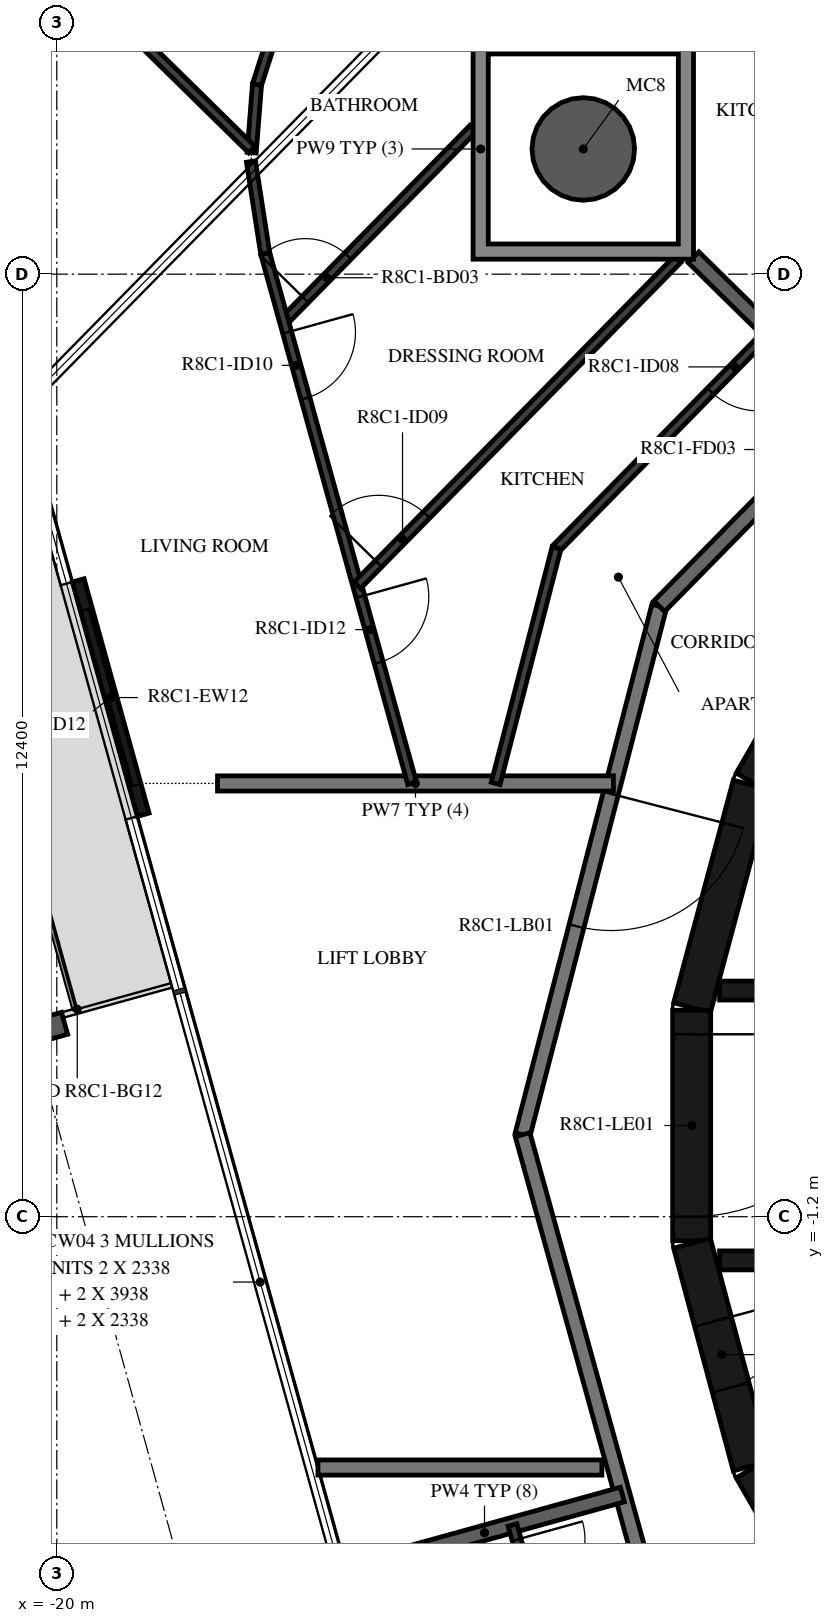
"""IFC4 building model, lengths in metres.
Left out: names, types, materials, properties, quantities, classifications, styles, units other than length and angle.
Written with IfcOpenShell. Run it as: python <this file> out.ifc"""

import sys

from ifc_helpers import new_model, si_unit, direction, frame, frame_2d, origin, origin_2d, place, context, subcontext, project, spatial, polyline, rectangle, hollow_circle, i_section, outline, extrude, element, fill, save


model = new_model("IFC4")
c1 = context("Model", 3, precision=1e-05, world=origin(), true_north=direction((0.0, 1.0)))
c2 = subcontext(c1, "Body", "Model", "MODEL_VIEW")
j1 = project(units=[si_unit("LENGTHUNIT", "METRE"), si_unit("PLANEANGLEUNIT", "RADIAN")], contexts=[c1])
p1 = place(None, origin())
s1 = spatial("IfcSite", under=j1, at=p1, CompositionType="ELEMENT")
p2 = place(p1, origin())
s2 = spatial("IfcBuilding", under=s1, at=p2, CompositionType="ELEMENT")
p3 = place(p2, frame((0.0, 0.0, 322.7)))
s3 = spatial("IfcBuildingStorey", under=s2, at=p3, CompositionType="ELEMENT", Elevation=322.7)
p4 = place(p3, frame((-13.073, 12.847, -0.38), z_axis=(0.0, 0.0, 1.0), x_axis=(1.0, 0.0, 0.0)))
e1 = element("IfcColumn", 1, at=p4, inside=s3, PredefinedType="COLUMN", context=c2, shape_type="SweptSolid", body=[
    extrude(hollow_circle(Radius=0.675, WallThickness=0.03, at=origin_2d()), origin(), (0.0, 0.0, 1.0), 2.616),
])
p5 = place(p3, frame((-20.331, 1.224, -0.38), z_axis=(0.0, 0.0, 1.0), x_axis=(-0.267238143562, 0.963630517691, 0.0)))
e2 = element("IfcColumn", 2, at=p5, inside=s3, PredefinedType="COLUMN", context=c2, shape_type="SweptSolid", body=[
    extrude(i_section(OverallWidth=0.3, OverallDepth=0.9, WebThickness=0.019, FlangeThickness=0.035, FilletRadius=0.03, at=origin_2d()), origin(), (0.0, 0.0, 1.0), 2.616),
])
p6 = place(p3, frame((-19.718, 7.171, 0.0), z_axis=(0.0, 0.0, 1.0), x_axis=(0.267266077957, -0.963622770369, 0.0)))
e3 = element("IfcWall", 3, at=p6, inside=s3, PredefinedType="STANDARD", context=c2, shape_type="SweptSolid", body=[
    extrude(rectangle(XDim=3.2, YDim=0.16, at=frame_2d((1.6, 0.0))), origin(), (0.0, 0.0, 1.0), 3.05),
])
p7 = place(p6, frame((0.4, 0.0, 0.0)))
e4 = element("IfcOpeningElement", 4, at=p7, cuts=e3, PredefinedType="OPENING", context=c2, shape_type="SweptSolid", body=[
    extrude(rectangle(XDim=2.4, YDim=2.4, at=frame_2d((1.2, 1.2))), frame((0.0, 0.09, 0.0), z_axis=(0.0, -1.0, 0.0), x_axis=(1.0, 0.0, 0.0)), (0.0, 0.0, 1.0), 0.18),
])
for number, where, z_axis, x_axis in (
    (5, (-9.329, 7.137, 0.0), (0.0, 0.0, 1.0), (-0.5, -0.866, 0.0)),
    (6, (-10.858, 4.479, 0.0), (0.0, 0.0, 1.0), (-0.259, -0.966, 0.0)),
):
    element("IfcWall", number, at=place(p3, frame(where, z_axis=z_axis, x_axis=x_axis)), inside=s3, PredefinedType="SHEAR", context=c2, shape_type="SweptSolid", body=[
        extrude(rectangle(XDim=3.033, YDim=0.5, at=frame_2d((1.516, 0.0))), origin(), (0.0, 0.0, 1.0), 3.05),
    ])
p8 = place(p3, frame((-11.647, 1.516, 0.0), z_axis=(0.0, 0.0, 1.0), x_axis=(0.0, -1.0, 0.0)))
e7 = element("IfcWall", 7, at=p8, inside=s3, PredefinedType="SHEAR", context=c2, shape_type="SweptSolid", body=[
    extrude(rectangle(XDim=3.033, YDim=0.5, at=frame_2d((1.516, 0.0))), origin(), (0.0, 0.0, 1.0), 3.05),
])
p9 = place(p8, frame((0.316, 0.0, 0.0)))
e8 = element("IfcOpeningElement", 8, at=p9, cuts=e7, PredefinedType="OPENING", context=c2, shape_type="SweptSolid", body=[
    extrude(rectangle(XDim=2.4, YDim=2.1, at=frame_2d((1.2, 1.05))), frame((0.0, 0.26, 0.0), z_axis=(0.0, -1.0, 0.0), x_axis=(1.0, 0.0, 0.0)), (0.0, 0.0, 1.0), 0.52),
])
p10 = place(p3, frame((-11.643, -1.55, 0.0), z_axis=(0.0, 0.0, 1.0), x_axis=(0.258734743916, -0.965948410781, 0.0)))
e9 = element("IfcWall", 9, at=p10, inside=s3, PredefinedType="SHEAR", context=c2, shape_type="SweptSolid", body=[
    extrude(rectangle(XDim=3.033, YDim=0.5, at=frame_2d((1.516, 0.0))), origin(), (0.0, 0.0, 1.0), 3.05),
])
p11 = place(p10, frame((1.066, 0.0, 0.0)))
e10 = element("IfcOpeningElement", 10, at=p11, cuts=e9, PredefinedType="OPENING", context=c2, shape_type="SweptSolid", body=[
    extrude(rectangle(XDim=0.9, YDim=2.1, at=frame_2d((0.45, 1.05))), frame((0.0, 0.26, 0.0), z_axis=(0.0, -1.0, 0.0), x_axis=(1.0, 0.0, 0.0)), (0.0, 0.0, 1.0), 0.52),
])
p12 = place(p3, frame((-10.845, -4.51, 0.0), z_axis=(0.0, 0.0, 1.0), x_axis=(0.500087131594, -0.865975092491, 0.0)))
e11 = element("IfcWall", 11, at=p12, inside=s3, PredefinedType="SHEAR", context=c2, shape_type="SweptSolid", body=[
    extrude(rectangle(XDim=3.033, YDim=0.5, at=frame_2d((1.516, 0.0))), origin(), (0.0, 0.0, 1.0), 3.05),
])
p13 = place(p3, frame((-11.28, 1.775, 0.0), z_axis=(0.0, 0.0, 1.0), x_axis=(1.0, 0.0, 0.0)))
e12 = element("IfcWall", 12, at=p13, inside=s3, PredefinedType="SHEAR", context=c2, shape_type="SweptSolid", body=[
    extrude(rectangle(XDim=14.38, YDim=0.25, at=frame_2d((7.19, 0.0))), origin(), (0.0, 0.0, 1.0), 3.05),
])
p14 = place(p13, frame((3.305, 0.0, 0.0)))
e13 = element("IfcOpeningElement", 13, at=p14, cuts=e12, PredefinedType="OPENING", context=c2, shape_type="SweptSolid", body=[
    extrude(rectangle(XDim=0.9, YDim=2.1, at=frame_2d((0.45, 1.05))), frame((0.0, 0.135, 0.0), z_axis=(0.0, -1.0, 0.0), x_axis=(1.0, 0.0, 0.0)), (0.0, 0.0, 1.0), 0.27),
])
p15 = place(p13, frame((9.755, 0.0, 0.0)))
e14 = element("IfcOpeningElement", 14, at=p15, cuts=e12, PredefinedType="OPENING", context=c2, shape_type="SweptSolid", body=[
    extrude(rectangle(XDim=0.9, YDim=2.1, at=frame_2d((0.45, 1.05))), frame((0.0, 0.135, 0.0), z_axis=(0.0, -1.0, 0.0), x_axis=(1.0, 0.0, 0.0)), (0.0, 0.0, 1.0), 0.27),
])
p16 = place(p3, frame((-11.28, -1.775, 0.0), z_axis=(0.0, 0.0, 1.0), x_axis=(1.0, 0.0, 0.0)))
e15 = element("IfcWall", 15, at=p16, inside=s3, PredefinedType="SHEAR", context=c2, shape_type="SweptSolid", body=[
    extrude(rectangle(XDim=14.38, YDim=0.25, at=frame_2d((7.19, 0.0))), origin(), (0.0, 0.0, 1.0), 3.05),
])
p17 = place(p16, frame((6.43, 0.0, 0.0)))
e16 = element("IfcOpeningElement", 16, at=p17, cuts=e15, PredefinedType="OPENING", context=c2, shape_type="SweptSolid", body=[
    extrude(rectangle(XDim=1.1, YDim=2.1, at=frame_2d((0.55, 1.05))), frame((0.0, 0.135, 0.0), z_axis=(0.0, -1.0, 0.0), x_axis=(1.0, 0.0, 0.0)), (0.0, 0.0, 1.0), 0.27),
])
p18 = place(p16, frame((8.58, 0.0, 0.0)))
e17 = element("IfcOpeningElement", 17, at=p18, cuts=e15, PredefinedType="OPENING", context=c2, shape_type="SweptSolid", body=[
    extrude(rectangle(XDim=1.1, YDim=2.1, at=frame_2d((0.55, 1.05))), frame((0.0, 0.135, 0.0), z_axis=(0.0, -1.0, 0.0), x_axis=(1.0, 0.0, 0.0)), (0.0, 0.0, 1.0), 0.27),
])
p19 = place(p16, frame((10.73, 0.0, 0.0)))
e18 = element("IfcOpeningElement", 18, at=p19, cuts=e15, PredefinedType="OPENING", context=c2, shape_type="SweptSolid", body=[
    extrude(rectangle(XDim=1.1, YDim=2.1, at=frame_2d((0.55, 1.05))), frame((0.0, 0.135, 0.0), z_axis=(0.0, -1.0, 0.0), x_axis=(1.0, 0.0, 0.0)), (0.0, 0.0, 1.0), 0.27),
])
p20 = place(p16, frame((3.305, 0.0, 0.0)))
e19 = element("IfcOpeningElement", 19, at=p20, cuts=e15, PredefinedType="OPENING", context=c2, shape_type="SweptSolid", body=[
    extrude(rectangle(XDim=0.9, YDim=2.1, at=frame_2d((0.45, 1.05))), frame((0.0, 0.135, 0.0), z_axis=(0.0, -1.0, 0.0), x_axis=(1.0, 0.0, 0.0)), (0.0, 0.0, 1.0), 0.27),
])
p21 = place(p16, frame((12.98, 0.0, 0.0)))
e20 = element("IfcOpeningElement", 20, at=p21, cuts=e15, PredefinedType="OPENING", context=c2, shape_type="SweptSolid", body=[
    extrude(rectangle(XDim=0.9, YDim=2.1, at=frame_2d((0.45, 1.05))), frame((0.0, 0.135, 0.0), z_axis=(0.0, -1.0, 0.0), x_axis=(1.0, 0.0, 0.0)), (0.0, 0.0, 1.0), 0.27),
])
p22 = place(p3, frame((-12.074, 6.831, 0.0), z_axis=(0.0, 0.0, 1.0), x_axis=(-0.250391063186, -0.968144780225, 0.0)))
e21 = element("IfcWall", 21, at=p22, inside=s3, PredefinedType="STANDARD", context=c2, shape_type="SweptSolid", body=[
    extrude(rectangle(XDim=7.181, YDim=0.2, at=frame_2d((3.591, 0.0))), origin(), (0.0, 0.0, 1.0), 3.05),
])
p23 = place(p22, frame((2.548, 0.0, 0.0)))
e22 = element("IfcOpeningElement", 22, at=p23, cuts=e21, PredefinedType="OPENING", context=c2, shape_type="SweptSolid", body=[
    extrude(rectangle(XDim=1.8, YDim=2.1, at=frame_2d((0.9, 1.05))), frame((0.0, 0.11, 0.0), z_axis=(0.0, -1.0, 0.0), x_axis=(1.0, 0.0, 0.0)), (0.0, 0.0, 1.0), 0.22),
])
p24 = place(p3, frame((-13.872, -0.121, 0.0), z_axis=(0.0, 0.0, 1.0), x_axis=(0.267254575108, -0.963625960674, 0.0)))
e23 = element("IfcWall", 23, at=p24, inside=s3, PredefinedType="STANDARD", context=c2, shape_type="SweptSolid", body=[
    extrude(rectangle(XDim=7.181, YDim=0.2, at=frame_2d((3.591, 0.0))), origin(), (0.0, 0.0, 1.0), 3.05),
])
p25 = place(p3, frame((-7.041, 11.953, 0.0), z_axis=(0.0, 0.0, 1.0), x_axis=(-0.70090916255, -0.713250549143, 0.0)))
e24 = element("IfcWall", 24, at=p25, inside=s3, PredefinedType="STANDARD", context=c2, shape_type="SweptSolid", body=[
    extrude(rectangle(XDim=7.181, YDim=0.2, at=frame_2d((3.59, 0.0))), origin(), (0.0, 0.0, 1.0), 3.05),
])
p26 = place(p25, frame((2.39, 0.0, 0.0)))
e25 = element("IfcOpeningElement", 25, at=p26, cuts=e24, PredefinedType="OPENING", context=c2, shape_type="SweptSolid", body=[
    extrude(rectangle(XDim=1.0, YDim=2.1, at=frame_2d((0.5, 1.05))), frame((0.0, 0.11, 0.0), z_axis=(0.0, -1.0, 0.0), x_axis=(1.0, 0.0, 0.0)), (0.0, 0.0, 1.0), 0.22),
])
p27 = place(p25, frame((3.791, 0.0, 0.0)))
e26 = element("IfcOpeningElement", 26, at=p27, cuts=e24, PredefinedType="OPENING", context=c2, shape_type="SweptSolid", body=[
    extrude(rectangle(XDim=1.0, YDim=2.1, at=frame_2d((0.5, 1.05))), frame((0.0, 0.11, 0.0), z_axis=(0.0, -1.0, 0.0), x_axis=(1.0, 0.0, 0.0)), (0.0, 0.0, 1.0), 0.22),
])
p28 = place(p3, frame((-12.677, 4.5, 0.0), z_axis=(0.0, 0.0, 1.0), x_axis=(-1.0, 0.0, 0.0)))
e27 = element("IfcWall", 27, at=p28, inside=s3, PredefinedType="STANDARD", context=c2, shape_type="SweptSolid", body=[
    extrude(rectangle(XDim=5.208, YDim=0.2, at=frame_2d((2.604, 0.0))), origin(), (0.0, 0.0, 1.0), 3.05),
])
p29 = place(p3, frame((-16.564, -4.5, 0.0), z_axis=(0.0, 0.0, 1.0), x_axis=(1.0, 0.0, 0.0)))
e28 = element("IfcWall", 28, at=p29, inside=s3, PredefinedType="STANDARD", context=c2, shape_type="SweptSolid", body=[
    extrude(rectangle(XDim=3.736, YDim=0.2, at=frame_2d((1.868, 0.0))), origin(), (0.0, 0.0, 1.0), 3.05),
])
p30 = place(p3, frame((-11.623, 11.422, 0.0), z_axis=(0.0, 0.0, 1.0), x_axis=(0.713233657229, -0.700926351478, 0.0)))
e29 = element("IfcWall", 29, at=p30, inside=s3, PredefinedType="STANDARD", context=c2, shape_type="SweptSolid", body=[
    extrude(rectangle(XDim=2.896, YDim=0.2, at=frame_2d((1.448, 0.0))), origin(), (0.0, 0.0, 1.0), 3.05),
])
p31 = place(p3, frame((-16.187, -5.862, 0.0), z_axis=(0.0, 0.0, 1.0), x_axis=(0.963631166683, 0.267235803358, 0.0)))
e30 = element("IfcWall", 30, at=p31, inside=s3, PredefinedType="STANDARD", context=c2, shape_type="SweptSolid", body=[
    extrude(rectangle(XDim=3.765, YDim=0.2, at=frame_2d((1.882, 0.0))), origin(), (0.0, 0.0, 1.0), 3.05),
])
p32 = place(p3, frame((-8.413, 12.698, 0.0), z_axis=(0.0, 0.0, 1.0), x_axis=(-0.700901588882, -0.713257991686, 0.0)))
e31 = element("IfcWall", 31, at=p32, inside=s3, PredefinedType="PARTITIONING", context=c2, shape_type="SweptSolid", body=[
    extrude(rectangle(XDim=7.153, YDim=0.12, at=frame_2d((3.576, 0.0))), origin(), (0.0, 0.0, 1.0), 3.05),
])
p33 = place(p32, frame((3.36, 0.0, 0.0)))
e32 = element("IfcOpeningElement", 32, at=p33, cuts=e31, PredefinedType="OPENING", context=c2, shape_type="SweptSolid", body=[
    extrude(rectangle(XDim=0.9, YDim=2.1, at=frame_2d((0.45, 1.05))), frame((0.0, 0.07, 0.0), z_axis=(0.0, -1.0, 0.0), x_axis=(1.0, 0.0, 0.0)), (0.0, 0.0, 1.0), 0.14),
])
p34 = place(p3, frame((-13.426, 7.596, 0.0), z_axis=(0.0, 0.0, 1.0), x_axis=(-0.250342106136, -0.968157440655, 0.0)))
e33 = element("IfcWall", 33, at=p34, inside=s3, PredefinedType="PARTITIONING", context=c2, shape_type="SweptSolid", body=[
    extrude(rectangle(XDim=3.198, YDim=0.12, at=frame_2d((1.599, 0.0))), origin(), (0.0, 0.0, 1.0), 3.05),
])
p35 = place(p3, frame((-17.437, 12.798, 0.0), z_axis=(0.0, 0.0, 1.0), x_axis=(0.078482315782, 0.996915506003, 0.0)))
e34 = element("IfcWall", 34, at=p35, inside=s3, PredefinedType="PARTITIONING", context=c2, shape_type="SweptSolid", body=[
    extrude(rectangle(XDim=0.899, YDim=0.12, at=frame_2d((0.449, 0.0))), origin(), (0.0, 0.0, 1.0), 3.05),
])
p36 = place(p3, frame((-17.366, 13.695, 0.0), z_axis=(0.0, 0.0, 1.0), x_axis=(0.306405887477, 0.951900957096, 0.0)))
e35 = element("IfcWall", 35, at=p36, inside=s3, PredefinedType="PARTITIONING", context=c2, shape_type="SweptSolid", body=[
    extrude(rectangle(XDim=1.016, YDim=0.12, at=frame_2d((0.508, 0.0))), origin(), (0.0, 0.0, 1.0), 3.05),
])
p37 = place(p3, frame((-20.465, 15.817, 0.0), z_axis=(0.0, 0.0, 1.0), x_axis=(0.713254811643, -0.700904824971, 0.0)))
e36 = element("IfcWall", 36, at=p37, inside=s3, PredefinedType="PARTITIONING", context=c2, shape_type="SweptSolid", body=[
    extrude(rectangle(XDim=4.25, YDim=0.12, at=frame_2d((2.125, 0.0))), origin(), (0.0, 0.0, 1.0), 3.05),
])
p38 = place(p37, frame((0.4, 0.0, 0.0)))
e37 = element("IfcOpeningElement", 37, at=p38, cuts=e36, PredefinedType="OPENING", context=c2, shape_type="SweptSolid", body=[
    extrude(rectangle(XDim=0.9, YDim=2.1, at=frame_2d((0.45, 1.05))), frame((0.0, 0.07, 0.0), z_axis=(0.0, -1.0, 0.0), x_axis=(1.0, 0.0, 0.0)), (0.0, 0.0, 1.0), 0.14),
])
p39 = place(p3, frame((-17.011, 10.582, 0.0), z_axis=(0.0, 0.0, 1.0), x_axis=(0.700924288011, 0.713235685083, 0.0)))
e38 = element("IfcWall", 38, at=p39, inside=s3, PredefinedType="PARTITIONING", context=c2, shape_type="SweptSolid", body=[
    extrude(rectangle(XDim=3.55, YDim=0.12, at=frame_2d((1.775, 0.0))), origin(), (0.0, 0.0, 1.0), 3.05),
])
p40 = place(p39, frame((0.4, 0.0, 0.0)))
e39 = element("IfcOpeningElement", 39, at=p40, cuts=e38, PredefinedType="OPENING", context=c2, shape_type="SweptSolid", body=[
    extrude(rectangle(XDim=0.8, YDim=2.1, at=frame_2d((0.4, 1.05))), frame((0.0, 0.07, 0.0), z_axis=(0.0, -1.0, 0.0), x_axis=(1.0, 0.0, 0.0)), (0.0, 0.0, 1.0), 0.14),
])
p41 = place(p3, frame((-17.446, 12.682, 0.0), z_axis=(0.0, 0.0, 1.0), x_axis=(0.153612025092, -0.988131239131, 0.0)))
e40 = element("IfcWall", 40, at=p41, inside=s3, PredefinedType="PARTITIONING", context=c2, shape_type="SweptSolid", body=[
    extrude(rectangle(XDim=1.227, YDim=0.12, at=frame_2d((0.614, 0.0))), origin(), (0.0, 0.0, 1.0), 3.05),
])
p42 = place(p3, frame((-17.257, 11.469, 0.0), z_axis=(0.0, 0.0, 1.0), x_axis=(0.267222501114, -0.963634855585, 0.0)))
e41 = element("IfcWall", 41, at=p42, inside=s3, PredefinedType="PARTITIONING", context=c2, shape_type="SweptSolid", body=[
    extrude(rectangle(XDim=7.232, YDim=0.12, at=frame_2d((3.616, 0.0))), origin(), (0.0, 0.0, 1.0), 3.05),
])
p43 = place(p42, frame((1.074, 0.0, 0.0)))
e42 = element("IfcOpeningElement", 42, at=p43, cuts=e41, PredefinedType="OPENING", context=c2, shape_type="SweptSolid", body=[
    extrude(rectangle(XDim=0.9, YDim=2.1, at=frame_2d((0.45, 1.05))), frame((0.0, 0.07, 0.0), z_axis=(0.0, -1.0, 0.0), x_axis=(1.0, 0.0, 0.0)), (0.0, 0.0, 1.0), 0.14),
])
p44 = place(p42, frame((4.682, 0.0, 0.0)))
e43 = element("IfcOpeningElement", 43, at=p44, cuts=e41, PredefinedType="OPENING", context=c2, shape_type="SweptSolid", body=[
    extrude(rectangle(XDim=0.9, YDim=2.1, at=frame_2d((0.45, 1.05))), frame((0.0, 0.07, 0.0), z_axis=(0.0, -1.0, 0.0), x_axis=(1.0, 0.0, 0.0)), (0.0, 0.0, 1.0), 0.14),
])
p45 = place(p3, frame((-16.047, 7.105, 0.0), z_axis=(0.0, 0.0, 1.0), x_axis=(0.700892382646, 0.713267038316, 0.0)))
e44 = element("IfcWall", 44, at=p45, inside=s3, PredefinedType="PARTITIONING", context=c2, shape_type="SweptSolid", body=[
    extrude(rectangle(XDim=6.017, YDim=0.12, at=frame_2d((3.009, 0.0))), origin(), (0.0, 0.0, 1.0), 3.05),
])
p46 = place(p45, frame((0.4, 0.0, 0.0)))
e45 = element("IfcOpeningElement", 45, at=p46, cuts=e44, PredefinedType="OPENING", context=c2, shape_type="SweptSolid", body=[
    extrude(rectangle(XDim=0.9, YDim=2.1, at=frame_2d((0.45, 1.05))), frame((0.0, 0.07, 0.0), z_axis=(0.0, -1.0, 0.0), x_axis=(1.0, 0.0, 0.0)), (0.0, 0.0, 1.0), 0.14),
])
p47 = place(p3, frame((-14.005, -5.256, 0.0), z_axis=(0.0, 0.0, 1.0), x_axis=(0.267200500487, -0.963640956238, 0.0)))
e46 = element("IfcWall", 46, at=p47, inside=s3, PredefinedType="PARTITIONING", context=c2, shape_type="SweptSolid", body=[
    extrude(rectangle(XDim=2.67, YDim=0.12, at=frame_2d((1.335, 0.0))), origin(), (0.0, 0.0, 1.0), 3.05),
])
p48 = place(p47, frame((0.2, 0.0, 0.0)))
e47 = element("IfcOpeningElement", 47, at=p48, cuts=e46, PredefinedType="OPENING", context=c2, shape_type="SweptSolid", body=[
    extrude(rectangle(XDim=0.9, YDim=2.1, at=frame_2d((0.45, 1.05))), frame((0.0, 0.07, 0.0), z_axis=(0.0, -1.0, 0.0), x_axis=(1.0, 0.0, 0.0)), (0.0, 0.0, 1.0), 0.14),
])
p49 = place(p3, origin())
e48 = element("IfcWall", 48, at=p49, inside=s3, PredefinedType="STANDARD", context=c2, shape_type="SweptSolid", body=[
    extrude(outline(polyline([(-11.623, 14.297), (-11.623, 11.397), (-14.523, 11.397), (-14.523, 14.297), (-11.623, 14.297)]), holes=[polyline([(-14.323, 11.597), (-11.823, 11.597), (-11.823, 14.097), (-14.323, 14.097), (-14.323, 11.597)])]), origin(), (0.0, 0.0, 1.0), 3.05),
])
p50 = place(p7, origin())
e49 = element("IfcDoor", 49, at=p50, inside=s3, OperationType="DOUBLE_DOOR_SLIDING", PredefinedType="DOOR", context=c2, shape_type="SweptSolid", body=[
    extrude(rectangle(XDim=2.4, YDim=2.4, at=frame_2d((1.2, 1.2))), frame((0.0, 0.025, 0.0), z_axis=(0.0, -1.0, 0.0), x_axis=(1.0, 0.0, 0.0)), (0.0, 0.0, 1.0), 0.05),
])
fill(e4, e49)
p51 = place(p9, origin())
e50 = element("IfcDoor", 50, at=p51, inside=s3, OperationType="DOUBLE_DOOR_SINGLE_SWING", PredefinedType="DOOR", context=c2, shape_type="SweptSolid", body=[
    extrude(rectangle(XDim=2.4, YDim=2.1, at=frame_2d((1.2, 1.05))), frame((0.0, 0.025, 0.0), z_axis=(0.0, -1.0, 0.0), x_axis=(1.0, 0.0, 0.0)), (0.0, 0.0, 1.0), 0.05),
])
fill(e8, e50)
p52 = place(p11, origin())
e51 = element("IfcDoor", 51, at=p52, inside=s3, OperationType="SINGLE_SWING_RIGHT", PredefinedType="DOOR", context=c2, shape_type="SweptSolid", body=[
    extrude(rectangle(XDim=0.9, YDim=2.1, at=frame_2d((0.45, 1.05))), frame((0.0, 0.025, 0.0), z_axis=(0.0, -1.0, 0.0), x_axis=(1.0, 0.0, 0.0)), (0.0, 0.0, 1.0), 0.05),
])
fill(e10, e51)
p53 = place(p33, origin())
e52 = element("IfcDoor", 52, at=p53, inside=s3, OperationType="SINGLE_SWING_LEFT", PredefinedType="DOOR", context=c2, shape_type="SweptSolid", body=[
    extrude(rectangle(XDim=0.9, YDim=2.1, at=frame_2d((0.45, 1.05))), frame((0.0, 0.025, 0.0), z_axis=(0.0, -1.0, 0.0), x_axis=(1.0, 0.0, 0.0)), (0.0, 0.0, 1.0), 0.05),
])
fill(e32, e52)
p54 = place(p46, origin())
e53 = element("IfcDoor", 53, at=p54, inside=s3, OperationType="SINGLE_SWING_LEFT", PredefinedType="DOOR", context=c2, shape_type="SweptSolid", body=[
    extrude(rectangle(XDim=0.9, YDim=2.1, at=frame_2d((0.45, 1.05))), frame((0.0, 0.025, 0.0), z_axis=(0.0, -1.0, 0.0), x_axis=(1.0, 0.0, 0.0)), (0.0, 0.0, 1.0), 0.05),
])
fill(e45, e53)
p55 = place(p40, origin())
e54 = element("IfcDoor", 54, at=p55, inside=s3, OperationType="SINGLE_SWING_LEFT", PredefinedType="DOOR", context=c2, shape_type="SweptSolid", body=[
    extrude(rectangle(XDim=0.8, YDim=2.1, at=frame_2d((0.4, 1.05))), frame((0.0, 0.025, 0.0), z_axis=(0.0, -1.0, 0.0), x_axis=(1.0, 0.0, 0.0)), (0.0, 0.0, 1.0), 0.05),
])
fill(e39, e54)
p56 = place(p43, origin())
e55 = element("IfcDoor", 55, at=p56, inside=s3, OperationType="SINGLE_SWING_LEFT", PredefinedType="DOOR", context=c2, shape_type="SweptSolid", body=[
    extrude(rectangle(XDim=0.9, YDim=2.1, at=frame_2d((0.45, 1.05))), frame((0.0, 0.025, 0.0), z_axis=(0.0, -1.0, 0.0), x_axis=(1.0, 0.0, 0.0)), (0.0, 0.0, 1.0), 0.05),
])
fill(e42, e55)
p57 = place(p44, origin())
e56 = element("IfcDoor", 56, at=p57, inside=s3, OperationType="SINGLE_SWING_RIGHT", PredefinedType="DOOR", context=c2, shape_type="SweptSolid", body=[
    extrude(rectangle(XDim=0.9, YDim=2.1, at=frame_2d((0.45, 1.05))), frame((0.0, 0.025, 0.0), z_axis=(0.0, -1.0, 0.0), x_axis=(1.0, 0.0, 0.0)), (0.0, 0.0, 1.0), 0.05),
])
fill(e43, e56)
p58 = place(p48, origin())
e57 = element("IfcDoor", 57, at=p58, inside=s3, OperationType="SINGLE_SWING_RIGHT", PredefinedType="DOOR", context=c2, shape_type="SweptSolid", body=[
    extrude(rectangle(XDim=0.9, YDim=2.1, at=frame_2d((0.45, 1.05))), frame((0.0, 0.025, 0.0), z_axis=(0.0, -1.0, 0.0), x_axis=(1.0, 0.0, 0.0)), (0.0, 0.0, 1.0), 0.05),
])
fill(e47, e57)
p59 = place(p23, origin())
e58 = element("IfcDoor", 58, at=p59, inside=s3, OperationType="DOUBLE_DOOR_SINGLE_SWING", PredefinedType="DOOR", context=c2, shape_type="SweptSolid", body=[
    extrude(rectangle(XDim=1.8, YDim=2.1, at=frame_2d((0.9, 1.05))), frame((0.0, 0.025, 0.0), z_axis=(0.0, -1.0, 0.0), x_axis=(1.0, 0.0, 0.0)), (0.0, 0.0, 1.0), 0.05),
])
fill(e22, e58)
save(model, sys.argv[1])
